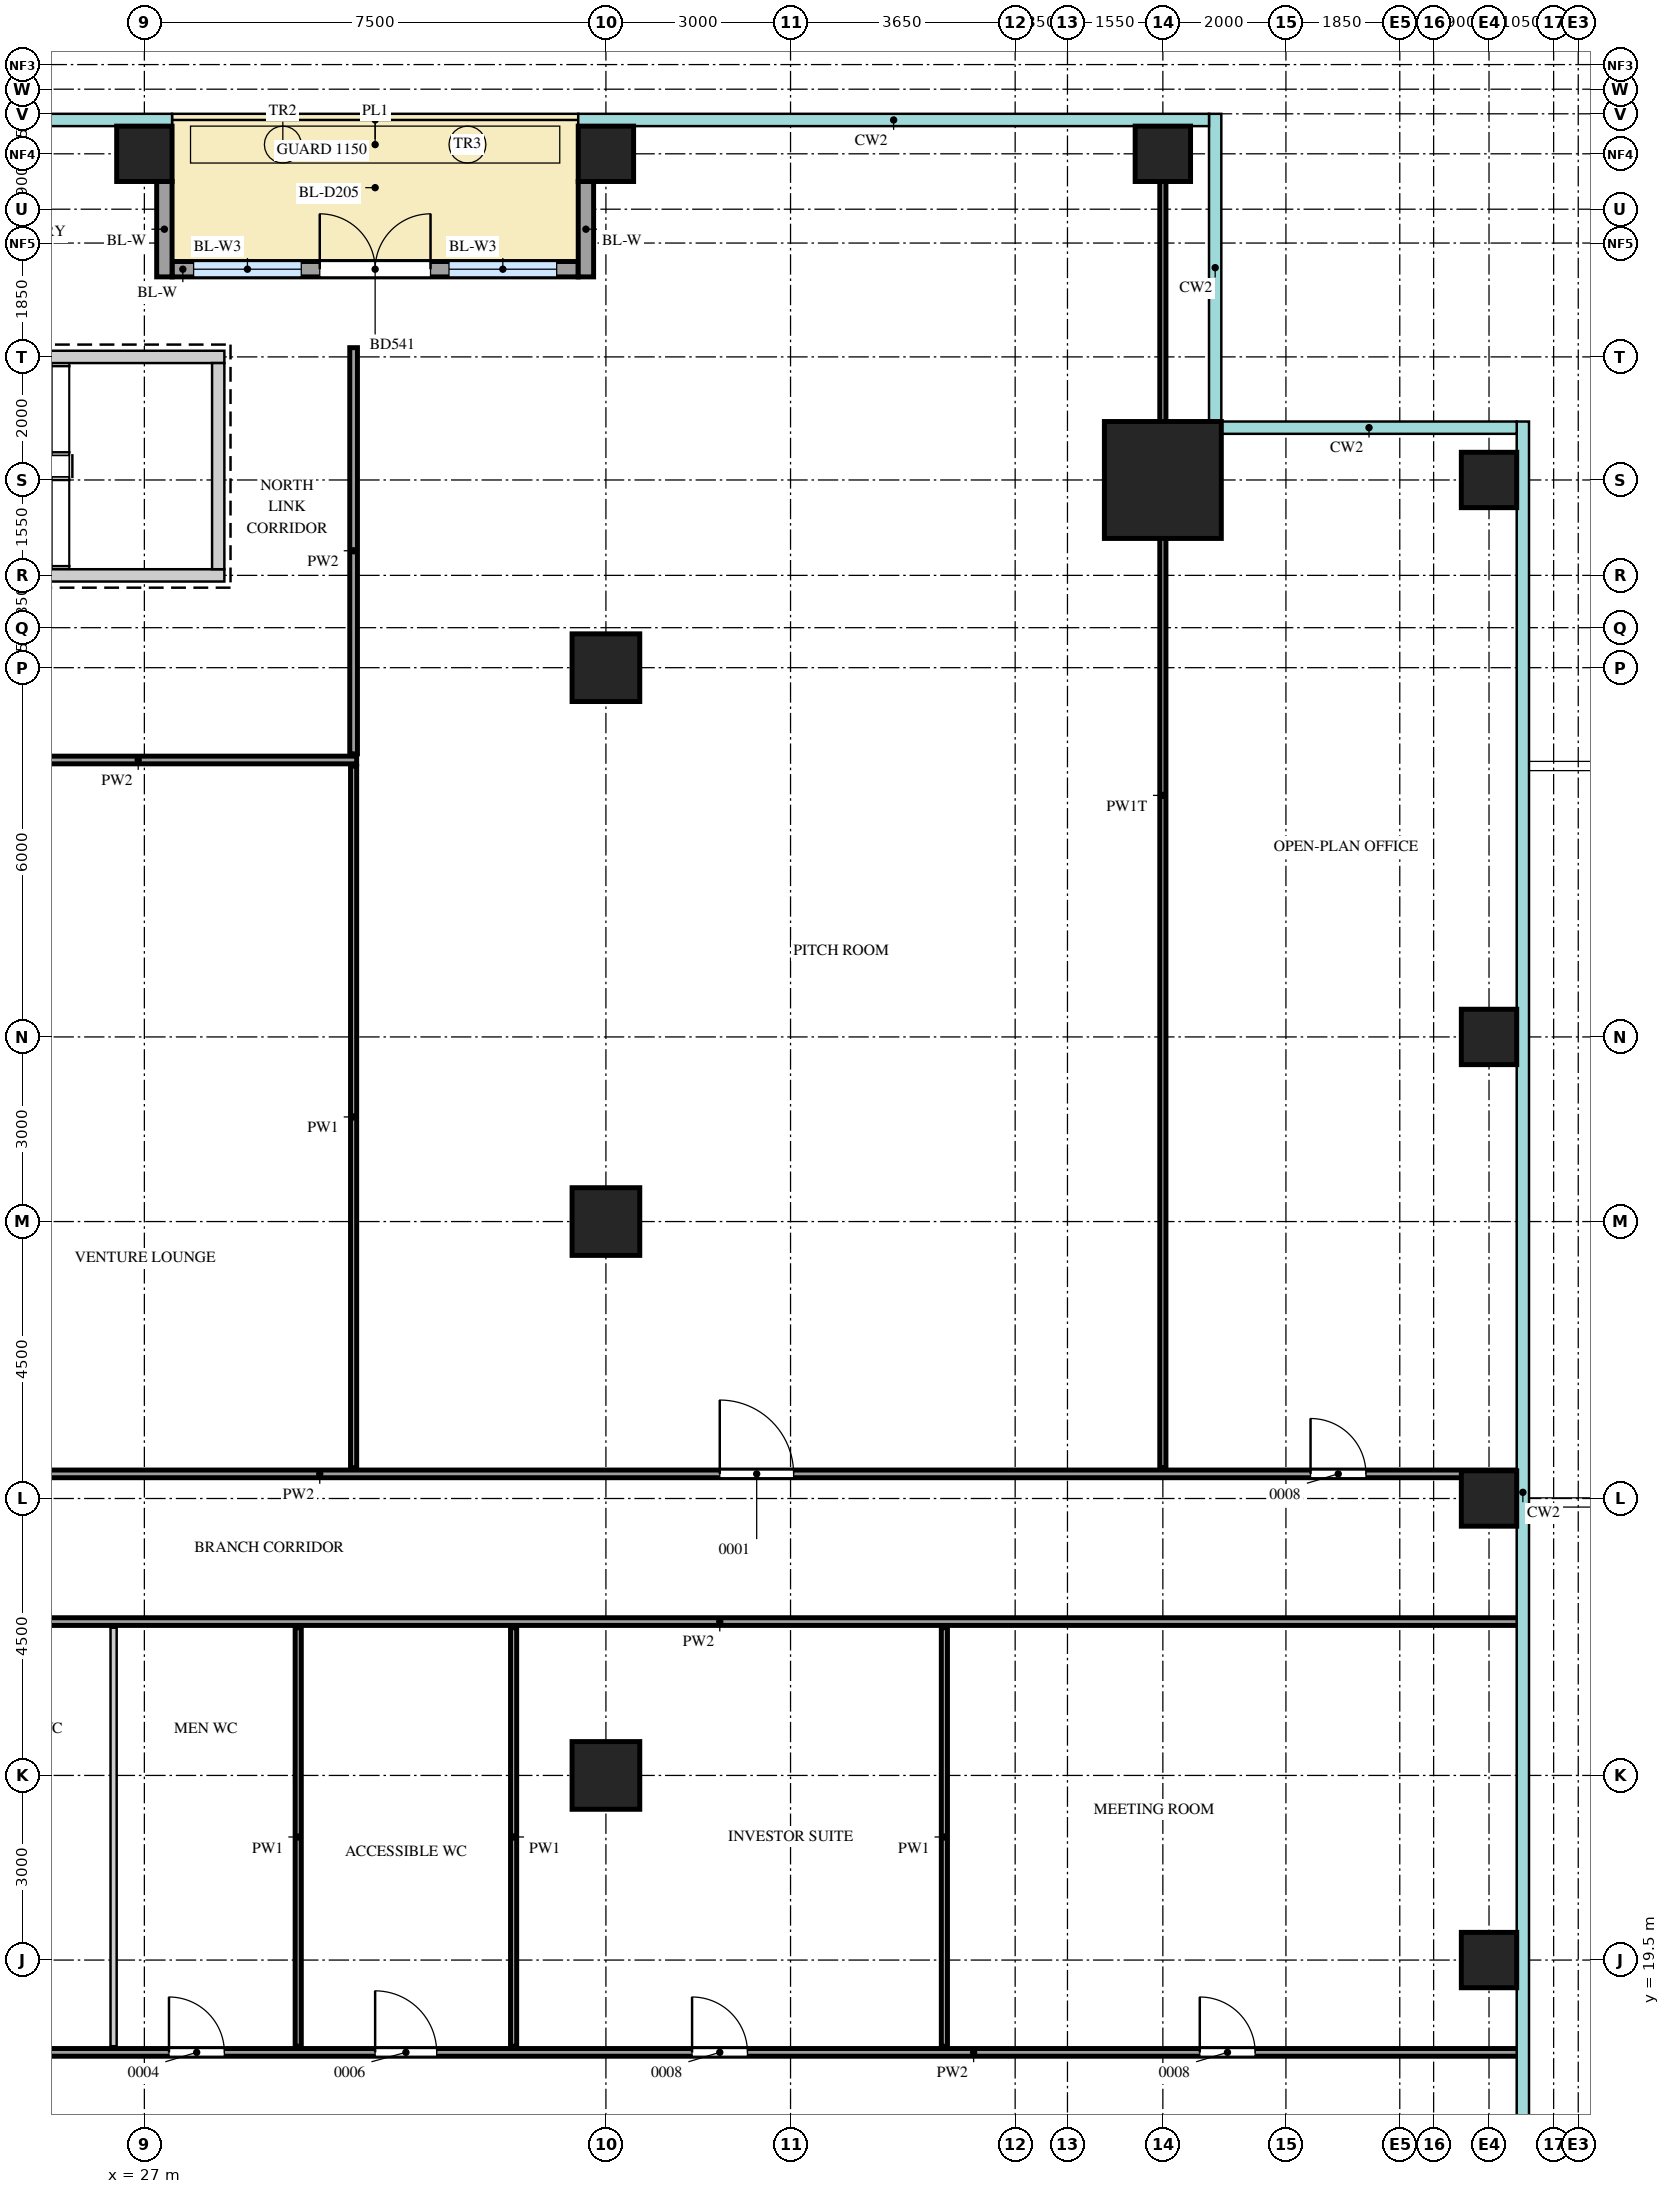
"""IFC4 building model, lengths in metres.
Left out: names, types, materials, properties, quantities, classifications, styles, units other than length and angle.
Written with IfcOpenShell. Run it as: python <this file> out.ifc"""

import sys

from ifc_helpers import new_model, si_unit, direction, frame, frame_2d, origin, origin_2d, place, context, subcontext, project, spatial, rectangle, extrude, source, transform, mapped, element, fill, save


model = new_model("IFC4")
c1 = context("Model", 3, precision=1e-05, world=origin(), true_north=direction((0.0, 1.0)))
c2 = subcontext(c1, "Body", "Model", "MODEL_VIEW")
j1 = project(units=[si_unit("LENGTHUNIT", "METRE"), si_unit("PLANEANGLEUNIT", "RADIAN")], contexts=[c1])
p1 = place(None, origin())
s1 = spatial("IfcSite", under=j1, at=p1, CompositionType="ELEMENT")
p2 = place(p1, origin())
s2 = spatial("IfcBuilding", under=s1, at=p2, CompositionType="ELEMENT")
p3 = place(p2, frame((0.0, 0.0, 242.2)))
s3 = spatial("IfcBuildingStorey", under=s2, at=p3, CompositionType="ELEMENT", Elevation=242.2)
m1 = source(origin(), c2, "Body", "SweptSolid", [
    extrude(rectangle(XDim=7.1, YDim=0.2, at=frame_2d((3.55, 0.0))), origin(), (0.0, 0.0, 1.0), 3.75),
])
p4 = place(p3, frame((21.2, 45.55, 0.0), z_axis=(0.0, 0.0, 1.0), x_axis=(1.0, 0.0, 0.0)))
e1 = element("IfcWall", 1, at=p4, inside=s3, PredefinedType="SHEAR", context=c2, shape_type="MappedRepresentation", body=[
    mapped(m1, transform((0.0, 0.0, 0.0))),
])
m2 = source(origin(), c2, "Body", "SweptSolid", [
    extrude(rectangle(XDim=1.2, YDim=2.1, at=frame_2d((0.6, 1.05))), frame((0.0, 0.11, 0.0), z_axis=(0.0, -1.0, 0.0), x_axis=(1.0, 0.0, 0.0)), (0.0, 0.0, 1.0), 0.22),
])
p5 = place(p4, frame((0.15, 0.0, 0.0)))
e2 = element("IfcOpeningElement", 2, at=p5, cuts=e1, PredefinedType="OPENING", context=c2, shape_type="MappedRepresentation", body=[
    mapped(m2, transform((0.0, 0.0, 0.0))),
])
p6 = place(p3, frame((21.2, 42.0, 0.0), z_axis=(0.0, 0.0, 1.0), x_axis=(1.0, 0.0, 0.0)))
e3 = element("IfcWall", 3, at=p6, inside=s3, PredefinedType="SHEAR", context=c2, shape_type="MappedRepresentation", body=[
    mapped(m1, transform((0.0, 0.0, 0.0))),
])
m3 = source(origin(), c2, "Body", "SweptSolid", [
    extrude(rectangle(XDim=3.35, YDim=0.2, at=frame_2d((1.675, 0.0))), origin(), (0.0, 0.0, 1.0), 3.75),
])
p7 = place(p3, frame((28.2, 42.1, 0.0), z_axis=(0.0, 0.0, 1.0), x_axis=(0.0, 1.0, 0.0)))
e4 = element("IfcWall", 4, at=p7, inside=s3, PredefinedType="SHEAR", context=c2, shape_type="MappedRepresentation", body=[
    mapped(m3, transform((0.0, 0.0, 0.0))),
])
m4 = source(origin(), c2, "Body", "SweptSolid", [
    extrude(rectangle(XDim=1.9, YDim=1.9, at=origin_2d()), origin(), (0.0, 0.0, 1.0), 4.0),
])
p8 = place(p3, frame((43.55, 43.55, 0.0), z_axis=(0.0, 0.0, 1.0), x_axis=(1.0, 0.0, 0.0)))
e5 = element("IfcColumn", 5, at=p8, inside=s3, PredefinedType="COLUMN", context=c2, shape_type="MappedRepresentation", body=[
    mapped(m4, transform((0.0, 0.0, 0.0))),
])
m5 = source(origin(), c2, "Body", "SweptSolid", [
    extrude(rectangle(XDim=0.9, YDim=0.9, at=origin_2d()), origin(), (0.0, 0.0, 1.0), 3.75),
])
for number, where, z_axis, x_axis in (
    (6, (48.85, 19.5, 0.0), (0.0, 0.0, 1.0), (1.0, 0.0, 0.0)),
    (7, (48.85, 27.0, 0.0), (0.0, 0.0, 1.0), (1.0, 0.0, 0.0)),
    (8, (48.85, 34.5, 0.0), (0.0, 0.0, 1.0), (1.0, 0.0, 0.0)),
    (9, (48.85, 43.55, 0.0), (0.0, 0.0, 1.0), (1.0, 0.0, 0.0)),
    (10, (27.0, 48.85, 0.0), (0.0, 0.0, 1.0), (1.0, 0.0, 0.0)),
    (11, (34.5, 48.85, 0.0), (0.0, 0.0, 1.0), (1.0, 0.0, 0.0)),
    (12, (43.55, 48.85, 0.0), (0.0, 0.0, 1.0), (1.0, 0.0, 0.0)),
):
    element("IfcColumn", number, at=place(p3, frame(where, z_axis=z_axis, x_axis=x_axis)), inside=s3, PredefinedType="COLUMN", context=c2, shape_type="MappedRepresentation", body=[
        mapped(m5, transform((0.0, 0.0, 0.0))),
    ])
m6 = source(origin(), c2, "Body", "SweptSolid", [
    extrude(rectangle(XDim=1.1, YDim=1.1, at=origin_2d()), origin(), (0.0, 0.0, 1.0), 3.75),
])
for number, where, z_axis, x_axis in (
    (13, (34.5, 22.5, 0.0), (0.0, 0.0, 1.0), (1.0, 0.0, 0.0)),
    (14, (34.5, 31.5, 0.0), (0.0, 0.0, 1.0), (1.0, 0.0, 0.0)),
    (15, (34.5, 40.5, 0.0), (0.0, 0.0, 1.0), (1.0, 0.0, 0.0)),
):
    element("IfcColumn", number, at=place(p3, frame(where, z_axis=z_axis, x_axis=x_axis)), inside=s3, PredefinedType="COLUMN", context=c2, shape_type="MappedRepresentation", body=[
        mapped(m6, transform((0.0, 0.0, 0.0))),
    ])
m7 = source(origin(), c2, "Body", "SweptSolid", [
    extrude(rectangle(XDim=6.6, YDim=0.25, at=frame_2d((3.3, 0.0))), origin(), (0.0, 0.0, 1.0), 3.75),
])
p9 = place(p3, frame((27.45, 46.975, 0.0), z_axis=(0.0, 0.0, 1.0), x_axis=(1.0, 0.0, 0.0)))
e16 = element("IfcWall", 16, at=p9, inside=s3, PredefinedType="SOLIDWALL", context=c2, shape_type="MappedRepresentation", body=[
    mapped(m7, transform((0.0, 0.0, 0.0))),
])
m8 = source(origin(), c2, "Body", "SweptSolid", [
    extrude(rectangle(XDim=1.75, YDim=2.4, at=frame_2d((0.875, 1.2))), frame((0.0, 0.135, 0.0), z_axis=(0.0, -1.0, 0.0), x_axis=(1.0, 0.0, 0.0)), (0.0, 0.0, 1.0), 0.27),
])
p10 = place(p9, frame((0.35, 0.0, 0.0)))
e17 = element("IfcOpeningElement", 17, at=p10, cuts=e16, PredefinedType="OPENING", context=c2, shape_type="MappedRepresentation", body=[
    mapped(m8, transform((0.0, 0.0, 0.0))),
])
p11 = place(p9, frame((4.5, 0.0, 0.0)))
e18 = element("IfcOpeningElement", 18, at=p11, cuts=e16, PredefinedType="OPENING", context=c2, shape_type="MappedRepresentation", body=[
    mapped(m8, transform((0.0, 0.0, 0.0))),
])
m9 = source(origin(), c2, "Body", "SweptSolid", [
    extrude(rectangle(XDim=1.8, YDim=2.4, at=frame_2d((0.9, 1.2))), frame((0.0, 0.135, 0.0), z_axis=(0.0, -1.0, 0.0), x_axis=(1.0, 0.0, 0.0)), (0.0, 0.0, 1.0), 0.27),
])
p12 = place(p9, frame((2.4, 0.0, 0.0)))
e19 = element("IfcOpeningElement", 19, at=p12, cuts=e16, PredefinedType="OPENING", context=c2, shape_type="MappedRepresentation", body=[
    mapped(m9, transform((0.0, 0.0, 0.0))),
])
m10 = source(origin(), c2, "Body", "SweptSolid", [
    extrude(rectangle(XDim=1.55, YDim=0.25, at=frame_2d((0.775, 0.0))), origin(), (0.0, 0.0, 1.0), 3.75),
])
for number, where, z_axis, x_axis in (
    (20, (27.325, 48.4, 0.0), (0.0, 0.0, 1.0), (0.0, -1.0, 0.0)),
    (21, (34.175, 48.4, 0.0), (0.0, 0.0, 1.0), (0.0, -1.0, 0.0)),
):
    element("IfcWall", number, at=place(p3, frame(where, z_axis=z_axis, x_axis=x_axis)), inside=s3, PredefinedType="SOLIDWALL", context=c2, shape_type="MappedRepresentation", body=[
        mapped(m10, transform((0.0, 0.0, 0.0))),
    ])
m11 = source(origin(), c2, "Body", "SweptSolid", [
    extrude(rectangle(XDim=26.0, YDim=0.125, at=frame_2d((13.0, 0.0))), origin(), (0.0, 0.0, 1.0), 3.8),
])
p13 = place(p3, frame((23.35, 18.0, 0.0), z_axis=(0.0, 0.0, 1.0), x_axis=(1.0, 0.0, 0.0)))
e22 = element("IfcWall", 22, at=p13, inside=s3, PredefinedType="PARTITIONING", context=c2, shape_type="MappedRepresentation", body=[
    mapped(m11, transform((0.0, 0.0, 0.0))),
])
m12 = source(origin(), c2, "Body", "SweptSolid", [
    extrude(rectangle(XDim=0.9, YDim=2.1, at=frame_2d((0.45, 1.05))), frame((0.0, 0.073, 0.0), z_axis=(0.0, -1.0, 0.0), x_axis=(1.0, 0.0, 0.0)), (0.0, 0.0, 1.0), 0.145),
])
p14 = place(p13, frame((4.05, 0.0, 0.0)))
e23 = element("IfcOpeningElement", 23, at=p14, cuts=e22, PredefinedType="OPENING", context=c2, shape_type="MappedRepresentation", body=[
    mapped(m12, transform((0.0, 0.0, 0.0))),
])
m13 = source(origin(), c2, "Body", "SweptSolid", [
    extrude(rectangle(XDim=1.0, YDim=2.1, at=frame_2d((0.5, 1.05))), frame((0.0, 0.073, 0.0), z_axis=(0.0, -1.0, 0.0), x_axis=(1.0, 0.0, 0.0)), (0.0, 0.0, 1.0), 0.145),
])
p15 = place(p13, frame((7.4, 0.0, 0.0)))
e24 = element("IfcOpeningElement", 24, at=p15, cuts=e22, PredefinedType="OPENING", context=c2, shape_type="MappedRepresentation", body=[
    mapped(m13, transform((0.0, 0.0, 0.0))),
])
p16 = place(p13, frame((12.55, 0.0, 0.0)))
e25 = element("IfcOpeningElement", 25, at=p16, cuts=e22, PredefinedType="OPENING", context=c2, shape_type="MappedRepresentation", body=[
    mapped(m12, transform((0.0, 0.0, 0.0))),
])
p17 = place(p13, frame((20.8, 0.0, 0.0)))
e26 = element("IfcOpeningElement", 26, at=p17, cuts=e22, PredefinedType="OPENING", context=c2, shape_type="MappedRepresentation", body=[
    mapped(m12, transform((0.0, 0.0, 0.0))),
])
m14 = source(origin(), c2, "Body", "SweptSolid", [
    extrude(rectangle(XDim=6.8, YDim=0.1, at=frame_2d((3.4, 0.0))), origin(), (0.0, 0.0, 1.0), 3.8),
])
for number, where, z_axis, x_axis in (
    (27, (26.5, 18.1, 0.0), (0.0, 0.0, 1.0), (0.0, 1.0, 0.0)),
    (28, (29.5, 18.1, 0.0), (0.0, 0.0, 1.0), (0.0, 1.0, 0.0)),
    (29, (33.0, 18.1, 0.0), (0.0, 0.0, 1.0), (0.0, 1.0, 0.0)),
    (30, (40.0, 18.1, 0.0), (0.0, 0.0, 1.0), (0.0, 1.0, 0.0)),
):
    element("IfcWall", number, at=place(p3, frame(where, z_axis=z_axis, x_axis=x_axis)), inside=s3, PredefinedType="PARTITIONING", context=c2, shape_type="MappedRepresentation", body=[
        mapped(m14, transform((0.0, 0.0, 0.0))),
    ])
p18 = place(p3, frame((23.35, 25.0, 0.0), z_axis=(0.0, 0.0, 1.0), x_axis=(1.0, 0.0, 0.0)))
e31 = element("IfcWall", 31, at=p18, inside=s3, PredefinedType="PARTITIONING", context=c2, shape_type="MappedRepresentation", body=[
    mapped(m11, transform((0.0, 0.0, 0.0))),
])
p19 = place(p3, frame((23.35, 27.4, 0.0), z_axis=(0.0, 0.0, 1.0), x_axis=(1.0, 0.0, 0.0)))
e32 = element("IfcWall", 32, at=p19, inside=s3, PredefinedType="PARTITIONING", context=c2, shape_type="MappedRepresentation", body=[
    mapped(m11, transform((0.0, 0.0, 0.0))),
])
m15 = source(origin(), c2, "Body", "SweptSolid", [
    extrude(rectangle(XDim=1.2, YDim=2.1, at=frame_2d((0.6, 1.05))), frame((0.0, 0.073, 0.0), z_axis=(0.0, -1.0, 0.0), x_axis=(1.0, 0.0, 0.0)), (0.0, 0.0, 1.0), 0.145),
])
p20 = place(p19, frame((13.0, 0.0, 0.0)))
e33 = element("IfcOpeningElement", 33, at=p20, cuts=e32, PredefinedType="OPENING", context=c2, shape_type="MappedRepresentation", body=[
    mapped(m15, transform((0.0, 0.0, 0.0))),
])
p21 = place(p19, frame((22.6, 0.0, 0.0)))
e34 = element("IfcOpeningElement", 34, at=p21, cuts=e32, PredefinedType="OPENING", context=c2, shape_type="MappedRepresentation", body=[
    mapped(m12, transform((0.0, 0.0, 0.0))),
])
m16 = source(origin(), c2, "Body", "SweptSolid", [
    extrude(rectangle(XDim=11.4, YDim=0.1, at=frame_2d((5.7, 0.0))), origin(), (0.0, 0.0, 1.0), 3.8),
])
p22 = place(p3, frame((30.4, 27.5, 0.0), z_axis=(0.0, 0.0, 1.0), x_axis=(0.0, 1.0, 0.0)))
e35 = element("IfcWall", 35, at=p22, inside=s3, PredefinedType="PARTITIONING", context=c2, shape_type="MappedRepresentation", body=[
    mapped(m16, transform((0.0, 0.0, 0.0))),
])
m17 = source(origin(), c2, "Body", "SweptSolid", [
    extrude(rectangle(XDim=21.85, YDim=0.1, at=frame_2d((10.925, 0.0))), origin(), (0.0, 0.0, 1.0), 3.3),
])
p23 = place(p3, frame((43.55, 27.5, 0.0), z_axis=(0.0, 0.0, 1.0), x_axis=(0.0, 1.0, 0.0)))
e36 = element("IfcWall", 36, at=p23, inside=s3, PredefinedType="PARTITIONING", context=c2, shape_type="MappedRepresentation", body=[
    mapped(m17, transform((0.0, 0.0, 0.0))),
])
m18 = source(origin(), c2, "Body", "SweptSolid", [
    extrude(rectangle(XDim=7.1, YDim=0.125, at=frame_2d((3.55, 0.0))), origin(), (0.0, 0.0, 1.0), 3.8),
])
p24 = place(p3, frame((23.35, 39.0, 0.0), z_axis=(0.0, 0.0, 1.0), x_axis=(1.0, 0.0, 0.0)))
e37 = element("IfcWall", 37, at=p24, inside=s3, PredefinedType="PARTITIONING", context=c2, shape_type="MappedRepresentation", body=[
    mapped(m18, transform((0.0, 0.0, 0.0))),
])
m19 = source(origin(), c2, "Body", "SweptSolid", [
    extrude(rectangle(XDim=6.6, YDim=0.125, at=frame_2d((3.3, 0.0))), origin(), (0.0, 0.0, 1.0), 3.8),
])
p25 = place(p3, frame((30.4, 39.1, 0.0), z_axis=(0.0, 0.0, 1.0), x_axis=(0.0, 1.0, 0.0)))
e38 = element("IfcWall", 38, at=p25, inside=s3, PredefinedType="PARTITIONING", context=c2, shape_type="MappedRepresentation", body=[
    mapped(m19, transform((0.0, 0.0, 0.0))),
])
m20 = source(origin(), c2, "Body", "SweptSolid", [
    extrude(rectangle(XDim=1.75, YDim=2.4, at=frame_2d((0.875, 1.2))), frame((0.0, 0.03, 0.0), z_axis=(0.0, -1.0, 0.0), x_axis=(1.0, 0.0, 0.0)), (0.0, 0.0, 1.0), 0.06),
])
p26 = place(p10, origin())
e39 = element("IfcWindow", 39, at=p26, inside=s3, PartitioningType="SINGLE_PANEL", PredefinedType="WINDOW", context=c2, shape_type="MappedRepresentation", body=[
    mapped(m20, transform((0.0, 0.0, 0.0))),
])
fill(e17, e39)
p27 = place(p11, origin())
e40 = element("IfcWindow", 40, at=p27, inside=s3, PartitioningType="SINGLE_PANEL", PredefinedType="WINDOW", context=c2, shape_type="MappedRepresentation", body=[
    mapped(m20, transform((0.0, 0.0, 0.0))),
])
fill(e18, e40)
m21 = source(origin(), c2, "Body", "SweptSolid", [
    extrude(rectangle(XDim=1.8, YDim=2.4, at=frame_2d((0.9, 1.2))), frame((0.0, 0.025, 0.0), z_axis=(0.0, -1.0, 0.0), x_axis=(1.0, 0.0, 0.0)), (0.0, 0.0, 1.0), 0.05),
])
p28 = place(p12, origin())
e41 = element("IfcDoor", 41, at=p28, inside=s3, OperationType="DOUBLE_DOOR_DOUBLE_SWING", PredefinedType="DOOR", context=c2, shape_type="MappedRepresentation", body=[
    mapped(m21, transform((0.0, 0.0, 0.0))),
])
fill(e19, e41)
m22 = source(origin(), c2, "Body", "SweptSolid", [
    extrude(rectangle(XDim=0.9, YDim=2.1, at=frame_2d((0.45, 1.05))), frame((0.0, 0.025, 0.0), z_axis=(0.0, -1.0, 0.0), x_axis=(1.0, 0.0, 0.0)), (0.0, 0.0, 1.0), 0.05),
])
p29 = place(p14, origin())
e42 = element("IfcDoor", 42, at=p29, inside=s3, OperationType="SINGLE_SWING_RIGHT", PredefinedType="DOOR", context=c2, shape_type="MappedRepresentation", body=[
    mapped(m22, transform((0.0, 0.0, 0.0))),
])
fill(e23, e42)
m23 = source(origin(), c2, "Body", "SweptSolid", [
    extrude(rectangle(XDim=1.0, YDim=2.1, at=frame_2d((0.5, 1.05))), frame((0.0, 0.025, 0.0), z_axis=(0.0, -1.0, 0.0), x_axis=(1.0, 0.0, 0.0)), (0.0, 0.0, 1.0), 0.05),
])
p30 = place(p15, origin())
e43 = element("IfcDoor", 43, at=p30, inside=s3, OperationType="SINGLE_SWING_RIGHT", PredefinedType="DOOR", context=c2, shape_type="MappedRepresentation", body=[
    mapped(m23, transform((0.0, 0.0, 0.0))),
])
fill(e24, e43)
p31 = place(p16, origin())
e44 = element("IfcDoor", 44, at=p31, inside=s3, OperationType="SINGLE_SWING_RIGHT", PredefinedType="DOOR", context=c2, shape_type="MappedRepresentation", body=[
    mapped(m22, transform((0.0, 0.0, 0.0))),
])
fill(e25, e44)
p32 = place(p17, origin())
e45 = element("IfcDoor", 45, at=p32, inside=s3, OperationType="SINGLE_SWING_RIGHT", PredefinedType="DOOR", context=c2, shape_type="MappedRepresentation", body=[
    mapped(m22, transform((0.0, 0.0, 0.0))),
])
fill(e26, e45)
m24 = source(origin(), c2, "Body", "SweptSolid", [
    extrude(rectangle(XDim=1.2, YDim=2.1, at=frame_2d((0.6, 1.05))), frame((0.0, 0.025, 0.0), z_axis=(0.0, -1.0, 0.0), x_axis=(1.0, 0.0, 0.0)), (0.0, 0.0, 1.0), 0.05),
])
p33 = place(p20, origin())
e46 = element("IfcDoor", 46, at=p33, inside=s3, OperationType="SINGLE_SWING_RIGHT", PredefinedType="DOOR", context=c2, shape_type="MappedRepresentation", body=[
    mapped(m24, transform((0.0, 0.0, 0.0))),
])
fill(e33, e46)
p34 = place(p21, origin())
e47 = element("IfcDoor", 47, at=p34, inside=s3, OperationType="SINGLE_SWING_RIGHT", PredefinedType="DOOR", context=c2, shape_type="MappedRepresentation", body=[
    mapped(m22, transform((0.0, 0.0, 0.0))),
])
fill(e34, e47)
save(model, sys.argv[1])
